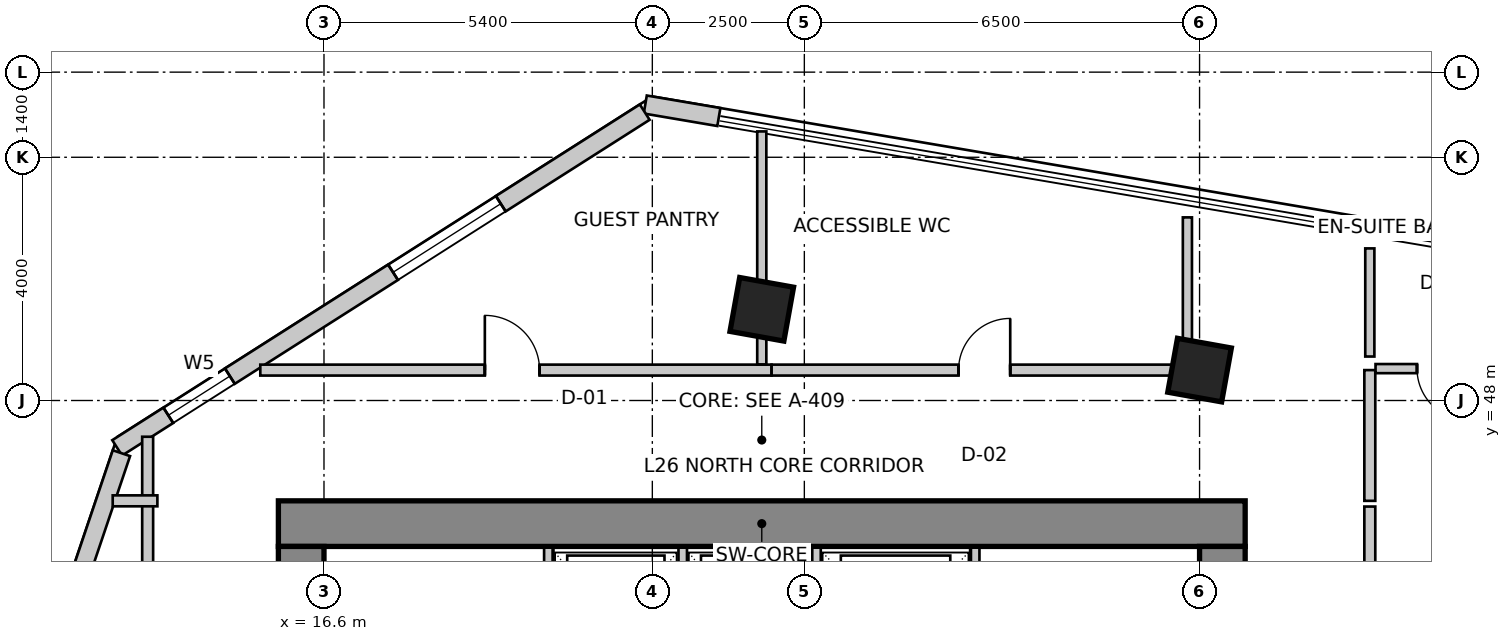
"""IFC4 building model, lengths in metres.
Left out: names, types, materials, properties, quantities, classifications, styles, units other than length and angle.
Written with IfcOpenShell. Run it as: python <this file> out.ifc"""

import sys

from ifc_helpers import new_model, si_unit, direction, frame, frame_2d, origin, origin_2d, place, context, subcontext, project, spatial, rectangle, extrude, source, transform, mapped, element, fill, save


model = new_model("IFC4")
c1 = context("Model", 3, precision=1e-05, world=origin(), true_north=direction((0.0, 1.0)))
c2 = subcontext(c1, "Body", "Model", "MODEL_VIEW")
j1 = project(units=[si_unit("LENGTHUNIT", "METRE"), si_unit("PLANEANGLEUNIT", "RADIAN")], contexts=[c1])
p1 = place(None, origin())
s1 = spatial("IfcSite", under=j1, at=p1, CompositionType="ELEMENT")
p2 = place(p1, origin())
s2 = spatial("IfcBuilding", under=s1, at=p2, CompositionType="ELEMENT")
p3 = place(p2, frame((0.0, 0.0, 110.6)))
s3 = spatial("IfcBuildingStorey", under=s2, at=p3, CompositionType="ELEMENT", Elevation=110.6)
p4 = place(p3, frame((15.85, 45.975, 0.0), z_axis=(0.0, 0.0, 1.0), x_axis=(1.0, 0.0, 0.0)))
e1 = element("IfcWall", 1, at=p4, inside=s3, PredefinedType="SHEAR", context=c2, shape_type="SweptSolid", body=[
    extrude(rectangle(XDim=15.9, YDim=0.75, at=frame_2d((7.95, 0.0))), origin(), (0.0, 0.0, 1.0), 3.6),
])
p5 = place(p3, frame((16.225, 34.2, 0.0), z_axis=(0.0, 0.0, 1.0), x_axis=(0.0, 1.0, 0.0)))
e2 = element("IfcWall", 2, at=p5, inside=s3, PredefinedType="SHEAR", context=c2, shape_type="SweptSolid", body=[
    extrude(rectangle(XDim=11.4, YDim=0.75, at=frame_2d((5.7, 0.0))), origin(), (0.0, 0.0, 1.0), 3.6),
])
m1 = source(origin(), c2, "Body", "SweptSolid", [
    extrude(rectangle(XDim=1.1, YDim=2.15, at=frame_2d((0.55, 1.075))), frame((0.0, 0.385, 0.0), z_axis=(0.0, -1.0, 0.0), x_axis=(1.0, 0.0, 0.0)), (0.0, 0.0, 1.0), 0.77),
])
p6 = place(p5, frame((7.15, 0.0, 0.0)))
e3 = element("IfcOpeningElement", 3, at=p6, cuts=e2, PredefinedType="OPENING", context=c2, shape_type="MappedRepresentation", body=[
    mapped(m1, transform((0.0, 0.0, 0.0), scale=1.0)),
])
p7 = place(p3, frame((31.375, 34.2, 0.0), z_axis=(0.0, 0.0, 1.0), x_axis=(0.0, 1.0, 0.0)))
e4 = element("IfcWall", 4, at=p7, inside=s3, PredefinedType="SHEAR", context=c2, shape_type="SweptSolid", body=[
    extrude(rectangle(XDim=11.4, YDim=0.75, at=frame_2d((5.7, 0.0))), origin(), (0.0, 0.0, 1.0), 3.6),
])
p8 = place(p7, frame((7.35, 0.0, 0.0)))
e5 = element("IfcOpeningElement", 5, at=p8, cuts=e4, PredefinedType="OPENING", context=c2, shape_type="MappedRepresentation", body=[
    mapped(m1, transform((0.0, 0.0, 0.0), scale=1.0)),
])
m2 = source(origin(), c2, "Body", "SweptSolid", [
    extrude(rectangle(XDim=0.9, YDim=0.9, at=origin_2d()), origin(), (0.0, 0.0, 1.0), 3.6),
])
for number, where, z_axis, x_axis in (
    (6, (23.8, 49.5, 0.0), (0.0, 0.0, 1.0), (0.984, -0.177, 0.0)),
    (7, (31.0, 48.5, 0.0), (0.0, 0.0, 1.0), (0.984, -0.177, 0.0)),
):
    element("IfcColumn", number, at=place(p3, frame(where, z_axis=z_axis, x_axis=x_axis)), inside=s3, PredefinedType="COLUMN", context=c2, shape_type="MappedRepresentation", body=[
        mapped(m2, transform((0.0, 0.0, 0.0), scale=1.0)),
    ])
p9 = place(p3, frame((23.094, 52.662, 0.0), z_axis=(0.0, 0.0, 1.0), x_axis=(-0.985845658291, 0.167655414553, 0.0)))
e8 = element("IfcWall", 8, at=p9, inside=s3, PredefinedType="SOLIDWALL", context=c2, shape_type="SweptSolid", body=[
    extrude(rectangle(XDim=1.228, YDim=0.3, at=frame_2d((0.614, 0.0))), origin(), (0.0, 0.0, 1.0), 3.35),
])
p10 = place(p3, frame((21.875, 52.742, 0.0), z_axis=(0.0, 0.0, 1.0), x_axis=(-0.843662465249, -0.536873956092, 0.0)))
e9 = element("IfcWall", 9, at=p10, inside=s3, PredefinedType="SOLIDWALL", context=c2, shape_type="SweptSolid", body=[
    extrude(rectangle(XDim=10.284, YDim=0.3, at=frame_2d((5.142, 0.0))), origin(), (0.0, 0.0, 1.0), 3.35),
])
m3 = source(origin(), c2, "Body", "SweptSolid", [
    extrude(rectangle(XDim=2.1, YDim=2.0, at=frame_2d((1.05, 1.0))), frame((0.0, 0.16, 0.0), z_axis=(0.0, -1.0, 0.0), x_axis=(1.0, 0.0, 0.0)), (0.0, 0.0, 1.0), 0.32),
])
p11 = place(p10, frame((2.806, 0.0, 0.85)))
e10 = element("IfcOpeningElement", 10, at=p11, cuts=e9, PredefinedType="OPENING", context=c2, shape_type="MappedRepresentation", body=[
    mapped(m3, transform((0.0, 0.0, 0.0), scale=1.0)),
])
m4 = source(origin(), c2, "Body", "SweptSolid", [
    extrude(rectangle(XDim=1.2, YDim=1.6, at=frame_2d((0.6, 0.8))), frame((0.0, 0.16, 0.0), z_axis=(0.0, -1.0, 0.0), x_axis=(1.0, 0.0, 0.0)), (0.0, 0.0, 1.0), 0.32),
])
p12 = place(p10, frame((8.087, 0.0, 0.85)))
e11 = element("IfcOpeningElement", 11, at=p12, cuts=e9, PredefinedType="OPENING", context=c2, shape_type="MappedRepresentation", body=[
    mapped(m4, transform((0.0, 0.0, 0.0), scale=1.0)),
])
p13 = place(p3, frame((13.269, 47.134, 0.0), z_axis=(0.0, 0.0, 1.0), x_axis=(-0.319929596295, -0.947441319246, 0.0)))
e12 = element("IfcWall", 12, at=p13, inside=s3, PredefinedType="SOLIDWALL", context=c2, shape_type="SweptSolid", body=[
    extrude(rectangle(XDim=16.134, YDim=0.3, at=frame_2d((8.067, 0.0))), origin(), (0.0, 0.0, 1.0), 3.35),
])
m5 = source(origin(), c2, "Body", "SweptSolid", [
    extrude(rectangle(XDim=2.4, YDim=2.2, at=frame_2d((1.2, 1.1))), frame((0.0, 0.16, 0.0), z_axis=(0.0, -1.0, 0.0), x_axis=(1.0, 0.0, 0.0)), (0.0, 0.0, 1.0), 0.32),
])
p14 = place(p13, frame((2.276, 0.0, 0.85)))
e13 = element("IfcOpeningElement", 13, at=p14, cuts=e12, PredefinedType="OPENING", context=c2, shape_type="MappedRepresentation", body=[
    mapped(m5, transform((0.0, 0.0, 0.0), scale=1.0)),
])
p15 = place(p13, frame((7.361, 0.0, 0.85)))
e14 = element("IfcOpeningElement", 14, at=p15, cuts=e12, PredefinedType="OPENING", context=c2, shape_type="MappedRepresentation", body=[
    mapped(m3, transform((0.0, 0.0, 0.0), scale=1.0)),
])
p16 = place(p13, frame((12.147, 0.0, 0.85)))
e15 = element("IfcOpeningElement", 15, at=p16, cuts=e12, PredefinedType="OPENING", context=c2, shape_type="MappedRepresentation", body=[
    mapped(m5, transform((0.0, 0.0, 0.0), scale=1.0)),
])
for number, where, z_axis, x_axis in (
    (16, (20.29, 43.28, 0.0), (0.0, 0.0, 1.0), (0.0, 1.0, 0.0)),
    (17, (27.31, 43.28, 0.0), (0.0, 0.0, 1.0), (0.0, 1.0, 0.0)),
):
    element("IfcWall", number, at=place(p3, frame(where, z_axis=z_axis, x_axis=x_axis)), inside=s3, PredefinedType="SOLIDWALL", context=c2, shape_type="SweptSolid", body=[
        extrude(rectangle(XDim=2.3, YDim=0.14, at=frame_2d((1.15, 0.0))), origin(), (0.0, 0.0, 1.0), 3.35),
    ])
for number, where, z_axis, x_axis in (
    (18, (22.5, 43.02, 0.0), (0.0, 0.0, 1.0), (0.0, 1.0, 0.0)),
    (19, (24.7, 43.02, 0.0), (0.0, 0.0, 1.0), (0.0, 1.0, 0.0)),
):
    element("IfcWall", number, at=place(p3, frame(where, z_axis=z_axis, x_axis=x_axis)), inside=s3, PredefinedType="SOLIDWALL", context=c2, shape_type="SweptSolid", body=[
        extrude(rectangle(XDim=2.56, YDim=0.14, at=frame_2d((1.28, 0.0))), origin(), (0.0, 0.0, 1.0), 3.35),
    ])
p17 = place(p3, frame((13.7, 33.544, 0.0), z_axis=(0.0, 0.0, 1.0), x_axis=(0.0, 1.0, 0.0)))
e20 = element("IfcWall", 20, at=p17, inside=s3, PredefinedType="PARTITIONING", context=c2, shape_type="SweptSolid", body=[
    extrude(rectangle(XDim=13.86, YDim=0.18, at=frame_2d((6.93, 0.0))), origin(), (0.0, 0.0, 1.0), 2.492),
])
m6 = source(origin(), c2, "Body", "SweptSolid", [
    extrude(rectangle(XDim=0.9, YDim=2.15, at=frame_2d((0.45, 1.075))), frame((0.0, 0.1, 0.0), z_axis=(0.0, -1.0, 0.0), x_axis=(1.0, 0.0, 0.0)), (0.0, 0.0, 1.0), 0.2),
])
p18 = place(p17, frame((4.253, 0.0, 0.0)))
e21 = element("IfcOpeningElement", 21, at=p18, cuts=e20, PredefinedType="OPENING", context=c2, shape_type="MappedRepresentation", body=[
    mapped(m6, transform((0.0, 0.0, 0.0), scale=1.0)),
])
p19 = place(p3, frame((13.86, 46.35, 0.0), z_axis=(0.0, 0.0, 1.0), x_axis=(-1.0, 0.0, 0.0)))
e22 = element("IfcWall", 22, at=p19, inside=s3, PredefinedType="PARTITIONING", context=c2, shape_type="SweptSolid", body=[
    extrude(rectangle(XDim=0.735, YDim=0.18, at=frame_2d((0.367, 0.0))), origin(), (0.0, 0.0, 1.0), 3.35),
])
p20 = place(p3, frame((15.552, 48.5, 0.0), z_axis=(0.0, 0.0, 1.0), x_axis=(1.0, 0.0, 0.0)))
e23 = element("IfcWall", 23, at=p20, inside=s3, PredefinedType="PARTITIONING", context=c2, shape_type="SweptSolid", body=[
    extrude(rectangle(XDim=8.407, YDim=0.18, at=frame_2d((4.204, 0.0))), origin(), (0.0, 0.0, 1.0), 3.034),
])
p21 = place(p20, frame((3.693, 0.0, 0.0)))
e24 = element("IfcOpeningElement", 24, at=p21, cuts=e23, PredefinedType="OPENING", context=c2, shape_type="MappedRepresentation", body=[
    mapped(m6, transform((0.0, 0.0, 0.0), scale=1.0)),
])
p22 = place(p3, frame((23.962, 48.5, 0.0), z_axis=(0.0, 0.0, 1.0), x_axis=(1.0, 0.0, 0.0)))
e25 = element("IfcWall", 25, at=p22, inside=s3, PredefinedType="PARTITIONING", context=c2, shape_type="SweptSolid", body=[
    extrude(rectangle(XDim=6.998, YDim=0.18, at=frame_2d((3.499, 0.0))), origin(), (0.0, 0.0, 1.0), 2.492),
])
m7 = source(origin(), c2, "Body", "SweptSolid", [
    extrude(rectangle(XDim=0.85, YDim=2.15, at=frame_2d((0.425, 1.075))), frame((0.0, 0.1, 0.0), z_axis=(0.0, -1.0, 0.0), x_axis=(1.0, 0.0, 0.0)), (0.0, 0.0, 1.0), 0.2),
])
p23 = place(p22, frame((3.074, 0.0, 0.0)))
e26 = element("IfcOpeningElement", 26, at=p23, cuts=e25, PredefinedType="OPENING", context=c2, shape_type="MappedRepresentation", body=[
    mapped(m7, transform((0.0, 0.0, 0.0), scale=1.0)),
])
p24 = place(p3, frame((33.8, 48.5, 0.0), z_axis=(0.0, 0.0, 1.0), x_axis=(0.0, -1.0, 0.0)))
e27 = element("IfcWall", 27, at=p24, inside=s3, PredefinedType="PARTITIONING", context=c2, shape_type="SweptSolid", body=[
    extrude(rectangle(XDim=2.15, YDim=0.18, at=frame_2d((1.075, 0.0))), origin(), (0.0, 0.0, 1.0), 2.492),
])
p25 = place(p3, frame((33.8, 46.256, 0.0), z_axis=(0.0, 0.0, 1.0), x_axis=(0.0, -1.0, 0.0)))
e28 = element("IfcWall", 28, at=p25, inside=s3, PredefinedType="PARTITIONING", context=c2, shape_type="SweptSolid", body=[
    extrude(rectangle(XDim=8.416, YDim=0.18, at=frame_2d((4.208, 0.0))), origin(), (0.0, 0.0, 1.0), 2.922),
])
p26 = place(p3, frame((23.8, 52.425, 0.0), z_axis=(0.0, 0.0, 1.0), x_axis=(0.0, -1.0, 0.0)))
e29 = element("IfcWall", 29, at=p26, inside=s3, PredefinedType="PARTITIONING", context=c2, shape_type="SweptSolid", body=[
    extrude(rectangle(XDim=3.831, YDim=0.15, at=frame_2d((1.916, 0.0))), origin(), (0.0, 0.0, 1.0), 2.492),
])
p27 = place(p3, frame((36.108, 48.524, 0.0), z_axis=(0.0, 0.0, 1.0), x_axis=(-1.0, 0.0, 0.0)))
e30 = element("IfcWall", 30, at=p27, inside=s3, PredefinedType="PARTITIONING", context=c2, shape_type="SweptSolid", body=[
    extrude(rectangle(XDim=2.214, YDim=0.15, at=frame_2d((1.107, 0.0))), origin(), (0.0, 0.0, 1.0), 3.35),
])
m8 = source(origin(), c2, "Body", "SweptSolid", [
    extrude(rectangle(XDim=0.85, YDim=2.15, at=frame_2d((0.425, 1.075))), frame((0.0, 0.085, 0.0), z_axis=(0.0, -1.0, 0.0), x_axis=(1.0, 0.0, 0.0)), (0.0, 0.0, 1.0), 0.17),
])
p28 = place(p27, frame((0.682, 0.0, 0.0)))
e31 = element("IfcOpeningElement", 31, at=p28, cuts=e30, PredefinedType="OPENING", context=c2, shape_type="MappedRepresentation", body=[
    mapped(m8, transform((0.0, 0.0, 0.0), scale=1.0)),
])
p29 = place(p3, frame((30.8, 51.011, 0.0), z_axis=(0.0, 0.0, 1.0), x_axis=(0.0, -1.0, 0.0)))
e32 = element("IfcWall", 32, at=p29, inside=s3, PredefinedType="PARTITIONING", context=c2, shape_type="SweptSolid", body=[
    extrude(rectangle(XDim=2.292, YDim=0.15, at=frame_2d((1.146, 0.0))), origin(), (0.0, 0.0, 1.0), 3.35),
])
p30 = place(p3, frame((33.8, 48.723, 0.0), z_axis=(0.0, 0.0, 1.0), x_axis=(0.0, 1.0, 0.0)))
e33 = element("IfcWall", 33, at=p30, inside=s3, PredefinedType="PARTITIONING", context=c2, shape_type="SweptSolid", body=[
    extrude(rectangle(XDim=1.778, YDim=0.15, at=frame_2d((0.889, 0.0))), origin(), (0.0, 0.0, 1.0), 3.35),
])
m9 = source(origin(), c2, "Body", "SweptSolid", [
    extrude(rectangle(XDim=2.1, YDim=2.0, at=frame_2d((1.05, 1.0))), frame((0.0, -0.015, 0.0), z_axis=(0.0, -1.0, 0.0), x_axis=(1.0, 0.0, 0.0)), (0.0, 0.0, 1.0), 0.06),
])
p31 = place(p11, origin())
e34 = element("IfcWindow", 34, at=p31, inside=s3, PartitioningType="SINGLE_PANEL", PredefinedType="WINDOW", context=c2, shape_type="MappedRepresentation", body=[
    mapped(m9, transform((0.0, 0.0, 0.0), scale=1.0)),
])
fill(e10, e34)
m10 = source(origin(), c2, "Body", "SweptSolid", [
    extrude(rectangle(XDim=1.2, YDim=1.6, at=frame_2d((0.6, 0.8))), frame((0.0, -0.015, 0.0), z_axis=(0.0, -1.0, 0.0), x_axis=(1.0, 0.0, 0.0)), (0.0, 0.0, 1.0), 0.06),
])
p32 = place(p12, origin())
e35 = element("IfcWindow", 35, at=p32, inside=s3, PartitioningType="SINGLE_PANEL", PredefinedType="WINDOW", context=c2, shape_type="MappedRepresentation", body=[
    mapped(m10, transform((0.0, 0.0, 0.0), scale=1.0)),
])
fill(e11, e35)
m11 = source(origin(), c2, "Body", "SweptSolid", [
    extrude(rectangle(XDim=0.9, YDim=2.15, at=frame_2d((0.45, 1.075))), frame((0.0, 0.025, 0.0), z_axis=(0.0, -1.0, 0.0), x_axis=(1.0, 0.0, 0.0)), (0.0, 0.0, 1.0), 0.05),
])
p33 = place(p21, origin())
e36 = element("IfcDoor", 36, at=p33, inside=s3, OperationType="SINGLE_SWING_LEFT", PredefinedType="DOOR", context=c2, shape_type="MappedRepresentation", body=[
    mapped(m11, transform((0.0, 0.0, 0.0), scale=1.0)),
])
fill(e24, e36)
m12 = source(origin(), c2, "Body", "SweptSolid", [
    extrude(rectangle(XDim=0.85, YDim=2.15, at=frame_2d((0.425, 1.075))), frame((0.0, 0.025, 0.0), z_axis=(0.0, -1.0, 0.0), x_axis=(1.0, 0.0, 0.0)), (0.0, 0.0, 1.0), 0.05),
])
p34 = place(p23, origin())
e37 = element("IfcDoor", 37, at=p34, inside=s3, OperationType="SINGLE_SWING_RIGHT", PredefinedType="DOOR", context=c2, shape_type="MappedRepresentation", body=[
    mapped(m12, transform((0.0, 0.0, 0.0), scale=1.0)),
])
fill(e26, e37)
p35 = place(p28, origin())
e38 = element("IfcDoor", 38, at=p35, inside=s3, OperationType="SINGLE_SWING_LEFT", PredefinedType="DOOR", context=c2, shape_type="MappedRepresentation", body=[
    mapped(m12, transform((0.0, 0.0, 0.0), scale=1.0)),
])
fill(e31, e38)
save(model, sys.argv[1])
